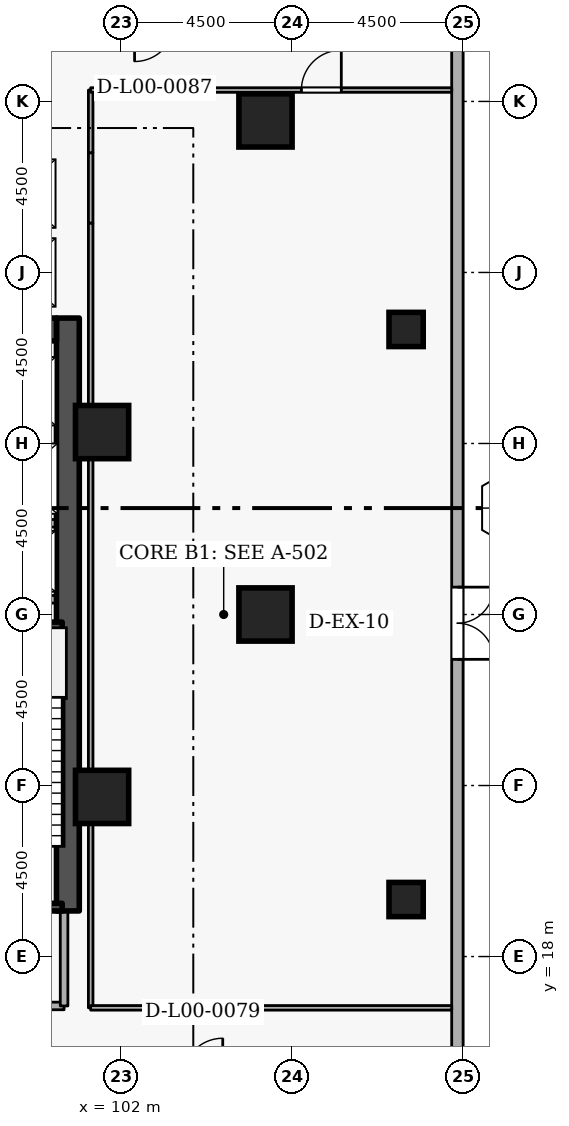
"""IFC4 building model, lengths in metres.
Left out: names, types, materials, properties, quantities, classifications, styles, units other than length and angle.
Written with IfcOpenShell. Run it as: python <this file> out.ifc"""

import sys

from ifc_helpers import new_model, si_unit, direction, frame, frame_2d, origin, origin_2d, place, context, subcontext, project, spatial, rectangle, extrude, element, fill, save


model = new_model("IFC4")
c1 = context("Model", 3, precision=1e-05, world=origin(), true_north=direction((0.0, 1.0)))
c2 = subcontext(c1, "Body", "Model", "MODEL_VIEW")
j1 = project(units=[si_unit("LENGTHUNIT", "METRE"), si_unit("PLANEANGLEUNIT", "RADIAN")], contexts=[c1])
p1 = place(None, origin())
s1 = spatial("IfcSite", under=j1, at=p1, CompositionType="ELEMENT")
p2 = place(p1, origin())
s2 = spatial("IfcBuilding", under=s1, at=p2, CompositionType="ELEMENT")
p3 = place(p2, origin())
s3 = spatial("IfcBuildingStorey", under=s2, at=p3, CompositionType="ELEMENT", Elevation=0.0)
p4 = place(p3, frame((100.6, 19.2, 0.0), z_axis=(0.0, 0.0, 1.0), x_axis=(0.0, 1.0, 0.0)))
e1 = element("IfcWall", 1, at=p4, inside=s3, PredefinedType="SHEAR", context=c2, shape_type="SweptSolid", body=[
    extrude(rectangle(XDim=15.6, YDim=0.6, at=frame_2d((7.8, 0.0))), origin(), (0.0, 0.0, 1.0), 4.8),
])
p5 = place(p3, frame((94.6, 34.5, 0.0), z_axis=(0.0, 0.0, 1.0), x_axis=(1.0, 0.0, 0.0)))
e2 = element("IfcWall", 2, at=p5, inside=s3, PredefinedType="SHEAR", context=c2, shape_type="SweptSolid", body=[
    extrude(rectangle(XDim=5.7, YDim=0.6, at=frame_2d((2.85, 0.0))), origin(), (0.0, 0.0, 1.0), 4.8),
])
for number, where, z_axis, x_axis in (
    (3, (105.8, 27.0, 0.0), (0.0, 0.0, 1.0), (1.0, 0.0, 0.0)),
    (4, (105.8, 40.0, 0.0), (0.0, 0.0, 1.0), (1.0, 0.0, 0.0)),
    (5, (101.5, 22.2, 0.0), (0.0, 0.0, 1.0), (1.0, 0.0, 0.0)),
    (6, (101.5, 31.8, 0.0), (0.0, 0.0, 1.0), (1.0, 0.0, 0.0)),
):
    element("IfcColumn", number, at=place(p3, frame(where, z_axis=z_axis, x_axis=x_axis)), inside=s3, PredefinedType="COLUMN", context=c2, shape_type="SweptSolid", body=[
        extrude(rectangle(XDim=1.4, YDim=1.4, at=origin_2d()), origin(), (0.0, 0.0, 1.0), 4.8),
    ])
for number, where, z_axis, x_axis in (
    (7, (109.5, 19.5, 0.0), (0.0, 0.0, 1.0), (1.0, 0.0, 0.0)),
    (8, (109.5, 34.5, 0.0), (0.0, 0.0, 1.0), (1.0, 0.0, 0.0)),
):
    element("IfcColumn", number, at=place(p3, frame(where, z_axis=z_axis, x_axis=x_axis)), inside=s3, PredefinedType="COLUMN", context=c2, shape_type="SweptSolid", body=[
        extrude(rectangle(XDim=0.9, YDim=0.9, at=origin_2d()), origin(), (0.0, 0.0, 1.0), 4.8),
    ])
p6 = place(p3, frame((110.85, 4.82, 0.0), z_axis=(0.0, 0.0, 1.0), x_axis=(0.0, 1.0, 0.0)))
e9 = element("IfcWall", 9, at=p6, inside=s3, PredefinedType="STANDARD", context=c2, shape_type="SweptSolid", body=[
    extrude(rectangle(XDim=44.36, YDim=0.3, at=frame_2d((22.18, 0.0))), origin(), (0.0, 0.0, 1.0), 3.86),
])
p7 = place(p6, frame((22.9, 0.0, 0.0), z_axis=(0.0, 0.0, 1.0), x_axis=(-1.0, 0.0, 0.0)))
e10 = element("IfcOpeningElement", 10, at=p7, cuts=e9, PredefinedType="OPENING", context=c2, shape_type="SweptSolid", body=[
    extrude(rectangle(XDim=1.9, YDim=2.25, at=frame_2d((0.95, 1.125))), frame((0.0, 0.16, 0.0), z_axis=(0.0, -1.0, 0.0), x_axis=(1.0, 0.0, 0.0)), (0.0, 0.0, 1.0), 0.32),
])
for number, where, z_axis, x_axis in (
    (11, (97.852, 29.4, 0.0), (0.0, 0.0, 1.0), (1.0, 0.0, 0.0)),
    (12, (97.852, 27.4, 0.0), (0.0, 0.0, 1.0), (1.0, 0.0, 0.0)),
):
    element("IfcWall", number, at=place(p3, frame(where, z_axis=z_axis, x_axis=x_axis)), inside=s3, PredefinedType="STANDARD", context=c2, shape_type="SweptSolid", body=[
        extrude(rectangle(XDim=2.436, YDim=0.2, at=frame_2d((1.218, 0.0))), origin(), (0.0, 0.0, 1.0), 4.46),
    ])
p8 = place(p3, frame((100.45, 19.3, 0.0), z_axis=(0.0, 0.0, 1.0), x_axis=(-1.0, 0.0, 0.0)))
e13 = element("IfcWall", 13, at=p8, inside=s3, PredefinedType="SHEAR", context=c2, shape_type="SweptSolid", body=[
    extrude(rectangle(XDim=3.35, YDim=0.2, at=frame_2d((1.675, 0.0))), origin(), (0.0, 0.0, 1.0), 4.8),
])
p9 = place(p8, frame((1.125, 0.0, 0.0)))
e14 = element("IfcOpeningElement", 14, at=p9, cuts=e13, PredefinedType="OPENING", context=c2, shape_type="SweptSolid", body=[
    extrude(rectangle(XDim=1.1, YDim=2.1, at=frame_2d((0.55, 1.05))), frame((0.0, 0.11, 0.0), z_axis=(0.0, -1.0, 0.0), x_axis=(1.0, 0.0, 0.0)), (0.0, 0.0, 1.0), 0.22),
])
p10 = place(p3, frame((97.1, 26.7, 0.0), z_axis=(0.0, 0.0, 1.0), x_axis=(1.0, 0.0, 0.0)))
e15 = element("IfcWall", 15, at=p10, inside=s3, PredefinedType="SHEAR", context=c2, shape_type="SweptSolid", body=[
    extrude(rectangle(XDim=3.35, YDim=0.2, at=frame_2d((1.675, 0.0))), origin(), (0.0, 0.0, 1.0), 4.8),
])
p11 = place(p3, frame((95.35, 16.7, 0.0), z_axis=(0.0, 0.0, 1.0), x_axis=(1.0, 0.0, 0.0)))
e16 = element("IfcWall", 16, at=p11, inside=s3, PredefinedType="STANDARD", context=c2, shape_type="SweptSolid", body=[
    extrude(rectangle(XDim=5.15, YDim=0.2, at=frame_2d((2.575, 0.0))), origin(), (0.0, 0.0, 1.0), 4.46),
])
p12 = place(p11, frame((2.917, 0.0, 0.0)))
e17 = element("IfcOpeningElement", 17, at=p12, cuts=e16, PredefinedType="OPENING", context=c2, shape_type="SweptSolid", body=[
    extrude(rectangle(XDim=1.15, YDim=2.1, at=frame_2d((0.575, 1.05))), frame((0.0, 0.11, 0.0), z_axis=(0.0, -1.0, 0.0), x_axis=(1.0, 0.0, 0.0)), (0.0, 0.0, 1.0), 0.22),
])
p13 = place(p11, frame((0.76, 0.0, 0.0)))
e18 = element("IfcOpeningElement", 18, at=p13, cuts=e16, PredefinedType="OPENING", context=c2, shape_type="SweptSolid", body=[
    extrude(rectangle(XDim=1.15, YDim=2.1, at=frame_2d((0.575, 1.05))), frame((0.0, 0.11, 0.0), z_axis=(0.0, -1.0, 0.0), x_axis=(1.0, 0.0, 0.0)), (0.0, 0.0, 1.0), 0.22),
])
p14 = place(p3, frame((100.5, 16.7, 0.0), z_axis=(0.0, 0.0, 1.0), x_axis=(0.0, 1.0, 0.0)))
e19 = element("IfcWall", 19, at=p14, inside=s3, PredefinedType="STANDARD", context=c2, shape_type="SweptSolid", body=[
    extrude(rectangle(XDim=2.5, YDim=0.2, at=frame_2d((1.25, 0.0))), origin(), (0.0, 0.0, 1.0), 4.46),
])
p15 = place(p3, frame((101.2, 16.65, 0.0), z_axis=(0.0, 0.0, 1.0), x_axis=(0.0, 1.0, 0.0)))
e20 = element("IfcWall", 20, at=p15, inside=s3, PredefinedType="PARTITIONING", context=c2, shape_type="SweptSolid", body=[
    extrude(rectangle(XDim=20.65, YDim=0.12, at=frame_2d((10.325, 0.0))), origin(), (0.0, 0.0, 1.0), 4.46),
])
p16 = place(p3, frame((101.2, 37.3, 0.0), z_axis=(0.0, 0.0, 1.0), x_axis=(0.0, 1.0, 0.0)))
e21 = element("IfcWall", 21, at=p16, inside=s3, PredefinedType="PARTITIONING", context=c2, shape_type="SweptSolid", body=[
    extrude(rectangle(XDim=1.85, YDim=0.12, at=frame_2d((0.925, 0.0))), origin(), (0.0, 0.0, 1.0), 4.46),
])
p17 = place(p3, frame((101.2, 39.15, 0.0), z_axis=(0.0, 0.0, 1.0), x_axis=(0.0, 1.0, 0.0)))
e22 = element("IfcWall", 22, at=p17, inside=s3, PredefinedType="PARTITIONING", context=c2, shape_type="SweptSolid", body=[
    extrude(rectangle(XDim=1.65, YDim=0.12, at=frame_2d((0.825, 0.0))), origin(), (0.0, 0.0, 1.0), 4.46),
])
p18 = place(p3, frame((101.2, 40.8, 0.0), z_axis=(0.0, 0.0, 1.0), x_axis=(1.0, 0.0, 0.0)))
e23 = element("IfcWall", 23, at=p18, inside=s3, PredefinedType="PARTITIONING", context=c2, shape_type="SweptSolid", body=[
    extrude(rectangle(XDim=9.5, YDim=0.12, at=frame_2d((4.75, 0.0))), origin(), (0.0, 0.0, 1.0), 4.46),
])
p19 = place(p18, frame((5.545, 0.0, 0.0)))
e24 = element("IfcOpeningElement", 24, at=p19, cuts=e23, PredefinedType="OPENING", context=c2, shape_type="SweptSolid", body=[
    extrude(rectangle(XDim=1.05, YDim=2.1, at=frame_2d((0.525, 1.05))), frame((0.0, 0.07, 0.0), z_axis=(0.0, -1.0, 0.0), x_axis=(1.0, 0.0, 0.0)), (0.0, 0.0, 1.0), 0.14),
])
p20 = place(p3, frame((110.7, 16.65, 0.0), z_axis=(0.0, 0.0, 1.0), x_axis=(-1.0, 0.0, 0.0)))
e25 = element("IfcWall", 25, at=p20, inside=s3, PredefinedType="PARTITIONING", context=c2, shape_type="SweptSolid", body=[
    extrude(rectangle(XDim=9.5, YDim=0.12, at=frame_2d((4.75, 0.0))), origin(), (0.0, 0.0, 1.0), 4.46),
])
p21 = place(p7, origin())
e26 = element("IfcDoor", 26, at=p21, inside=s3, OperationType="DOUBLE_DOOR_SINGLE_SWING", PredefinedType="DOOR", context=c2, shape_type="SweptSolid", body=[
    extrude(rectangle(XDim=1.9, YDim=2.25, at=frame_2d((0.95, 1.125))), frame((0.0, 0.025, 0.0), z_axis=(0.0, -1.0, 0.0), x_axis=(1.0, 0.0, 0.0)), (0.0, 0.0, 1.0), 0.05),
])
fill(e10, e26)
p22 = place(p19, origin())
e27 = element("IfcDoor", 27, at=p22, inside=s3, OperationType="SINGLE_SWING_RIGHT", PredefinedType="DOOR", context=c2, shape_type="SweptSolid", body=[
    extrude(rectangle(XDim=1.05, YDim=2.1, at=frame_2d((0.525, 1.05))), frame((0.0, 0.025, 0.0), z_axis=(0.0, -1.0, 0.0), x_axis=(1.0, 0.0, 0.0)), (0.0, 0.0, 1.0), 0.05),
])
fill(e24, e27)
save(model, sys.argv[1])
